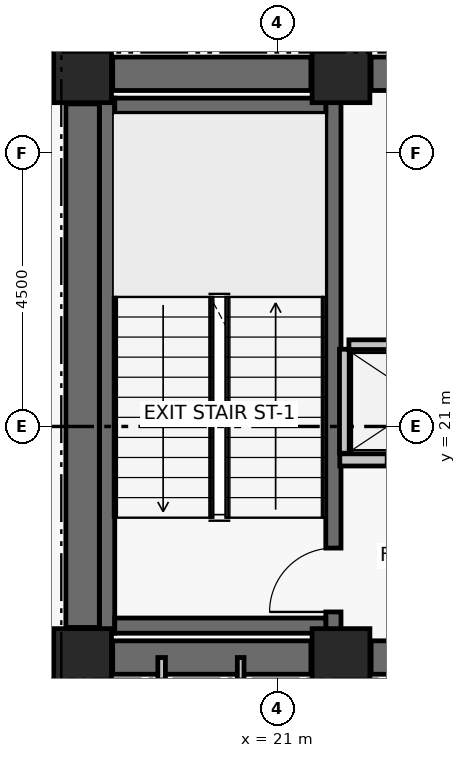
"""IFC4 building model, lengths in metres.
Left out: names, types, materials, properties, quantities, classifications, styles, units other than length and angle.
Written with IfcOpenShell. Run it as: python <this file> out.ifc"""

import sys

from ifc_helpers import new_model, si_unit, direction, frame, frame_2d, origin, origin_2d, place, context, subcontext, project, spatial, rectangle, extrude, element, fill, save


model = new_model("IFC4")
c1 = context("Model", 3, precision=1e-05, world=origin(), true_north=direction((0.0, 1.0)))
c2 = subcontext(c1, "Body", "Model", "MODEL_VIEW")
j1 = project(units=[si_unit("LENGTHUNIT", "METRE"), si_unit("PLANEANGLEUNIT", "RADIAN")], contexts=[c1])
p1 = place(None, origin())
s1 = spatial("IfcSite", under=j1, at=p1, CompositionType="ELEMENT")
p2 = place(p1, origin())
s2 = spatial("IfcBuilding", under=s1, at=p2, CompositionType="ELEMENT")
p3 = place(p2, frame((0.0, 0.0, 154.32)))
s3 = spatial("IfcBuildingStorey", under=s2, at=p3, CompositionType="ELEMENT", Elevation=154.32)
for number, where, z_axis, x_axis in (
    (1, (17.8, 17.2, 0.0), (0.0, 0.0, 1.0), (1.0, 0.0, 0.0)),
    (2, (22.05, 17.2, 0.0), (0.0, 0.0, 1.0), (1.0, 0.0, 0.0)),
    (3, (17.8, 26.8, 0.0), (0.0, 0.0, 1.0), (1.0, 0.0, 0.0)),
    (4, (22.05, 26.8, 0.0), (0.0, 0.0, 1.0), (1.0, 0.0, 0.0)),
):
    element("IfcColumn", number, at=place(p3, frame(where, z_axis=z_axis, x_axis=x_axis)), inside=s3, PredefinedType="COLUMN", context=c2, shape_type="SweptSolid", body=[
        extrude(rectangle(XDim=0.95, YDim=0.95, at=origin_2d()), origin(), (0.0, 0.0, 1.0), 3.72),
    ])
p4 = place(p3, frame((18.295, 17.2, 0.0), z_axis=(0.0, 0.0, 1.0), x_axis=(1.0, 0.0, 0.0)))
e5 = element("IfcWall", 5, at=p4, inside=s3, PredefinedType="SHEAR", context=c2, shape_type="SweptSolid", body=[
    extrude(rectangle(XDim=3.26, YDim=0.55, at=frame_2d((1.63, 0.0))), origin(), (0.0, 0.0, 1.0), 3.5),
])
p5 = place(p3, frame((22.545, 17.2, 0.0), z_axis=(0.0, 0.0, 1.0), x_axis=(1.0, 0.0, 0.0)))
e6 = element("IfcWall", 6, at=p5, inside=s3, PredefinedType="SHEAR", context=c2, shape_type="SweptSolid", body=[
    extrude(rectangle(XDim=1.805, YDim=0.55, at=frame_2d((0.903, 0.0))), origin(), (0.0, 0.0, 1.0), 3.5),
])
p6 = place(p3, frame((18.295, 26.8, 0.0), z_axis=(0.0, 0.0, 1.0), x_axis=(1.0, 0.0, 0.0)))
e7 = element("IfcWall", 7, at=p6, inside=s3, PredefinedType="SHEAR", context=c2, shape_type="SweptSolid", body=[
    extrude(rectangle(XDim=3.26, YDim=0.55, at=frame_2d((1.63, 0.0))), origin(), (0.0, 0.0, 1.0), 3.5),
])
p7 = place(p3, frame((22.545, 26.8, 0.0), z_axis=(0.0, 0.0, 1.0), x_axis=(1.0, 0.0, 0.0)))
e8 = element("IfcWall", 8, at=p7, inside=s3, PredefinedType="SHEAR", context=c2, shape_type="SweptSolid", body=[
    extrude(rectangle(XDim=1.805, YDim=0.55, at=frame_2d((0.903, 0.0))), origin(), (0.0, 0.0, 1.0), 3.5),
])
p8 = place(p3, frame((17.8, 17.695, 0.0), z_axis=(0.0, 0.0, 1.0), x_axis=(0.0, 1.0, 0.0)))
e9 = element("IfcWall", 9, at=p8, inside=s3, PredefinedType="SHEAR", context=c2, shape_type="SweptSolid", body=[
    extrude(rectangle(XDim=8.61, YDim=0.55, at=frame_2d((4.305, 0.0))), origin(), (0.0, 0.0, 1.0), 3.5),
])
p9 = place(p3, frame((18.204, 17.6, 0.0), z_axis=(0.0, 0.0, 1.0), x_axis=(0.0, 1.0, 0.0)))
e10 = element("IfcWall", 10, at=p9, inside=s3, PredefinedType="SHEAR", context=c2, shape_type="SweptSolid", body=[
    extrude(rectangle(XDim=8.8, YDim=0.25, at=frame_2d((4.4, 0.0))), origin(), (0.0, 0.0, 1.0), 3.5),
])
p10 = place(p3, frame((21.925, 17.6, 0.0), z_axis=(0.0, 0.0, 1.0), x_axis=(0.0, 1.0, 0.0)))
e11 = element("IfcWall", 11, at=p10, inside=s3, PredefinedType="SHEAR", context=c2, shape_type="SweptSolid", body=[
    extrude(rectangle(XDim=8.8, YDim=0.25, at=frame_2d((4.4, 0.0))), origin(), (0.0, 0.0, 1.0), 3.5),
])
p11 = place(p10, frame((0.35, 0.0, 0.0)))
e12 = element("IfcOpeningElement", 12, at=p11, cuts=e11, PredefinedType="OPENING", context=c2, shape_type="SweptSolid", body=[
    extrude(rectangle(XDim=1.05, YDim=2.08, at=frame_2d((0.525, 1.04))), frame((0.0, 0.135, 0.0), z_axis=(0.0, -1.0, 0.0), x_axis=(1.0, 0.0, 0.0)), (0.0, 0.0, 1.0), 0.27),
])
for number, where, z_axis, x_axis in (
    (13, (18.329, 17.725, 0.0), (0.0, 0.0, 1.0), (1.0, 0.0, 0.0)),
    (14, (18.329, 26.275, 0.0), (0.0, 0.0, 1.0), (1.0, 0.0, 0.0)),
):
    element("IfcWall", number, at=place(p3, frame(where, z_axis=z_axis, x_axis=x_axis)), inside=s3, PredefinedType="SHEAR", context=c2, shape_type="SweptSolid", body=[
        extrude(rectangle(XDim=3.471, YDim=0.25, at=frame_2d((1.735, 0.0))), origin(), (0.0, 0.0, 1.0), 3.5),
    ])
p12 = place(p3, frame((22.03, 20.45, 0.0), z_axis=(0.0, 0.0, 1.0), x_axis=(1.0, 0.0, 0.0)))
e15 = element("IfcWall", 15, at=p12, inside=s3, PredefinedType="PARTITIONING", context=c2, shape_type="SweptSolid", body=[
    extrude(rectangle(XDim=2.8, YDim=0.2, at=frame_2d((1.4, 0.0))), origin(), (0.0, 0.0, 1.0), 3.5),
])
p13 = place(p12, frame((0.78, 0.0, 0.0)))
e16 = element("IfcOpeningElement", 16, at=p13, cuts=e15, PredefinedType="OPENING", context=c2, shape_type="SweptSolid", body=[
    extrude(rectangle(XDim=1.1, YDim=2.08, at=frame_2d((0.55, 1.04))), frame((0.0, 0.11, 0.0), z_axis=(0.0, -1.0, 0.0), x_axis=(1.0, 0.0, 0.0)), (0.0, 0.0, 1.0), 0.22),
])
p14 = place(p3, frame((22.105, 20.56, 0.0), z_axis=(0.0, 0.0, 1.0), x_axis=(0.0, 1.0, 0.0)))
e17 = element("IfcWall", 17, at=p14, inside=s3, PredefinedType="PARTITIONING", context=c2, shape_type="SweptSolid", body=[
    extrude(rectangle(XDim=1.71, YDim=0.16, at=frame_2d((0.855, 0.0))), origin(), (0.0, 0.0, 1.0), 3.5),
])
p15 = place(p3, frame((22.18, 22.345, 0.0), z_axis=(0.0, 0.0, 1.0), x_axis=(1.0, 0.0, 0.0)))
e18 = element("IfcWall", 18, at=p15, inside=s3, PredefinedType="PARTITIONING", context=c2, shape_type="SweptSolid", body=[
    extrude(rectangle(XDim=2.65, YDim=0.16, at=frame_2d((1.325, 0.0))), origin(), (0.0, 0.0, 1.0), 3.5),
])
p16 = place(p3, frame((19.1, 14.95, 0.0), z_axis=(0.0, 0.0, 1.0), x_axis=(0.0, 1.0, 0.0)))
e19 = element("IfcWall", 19, at=p16, inside=s3, PredefinedType="PARTITIONING", context=c2, shape_type="SweptSolid", body=[
    extrude(rectangle(XDim=2.25, YDim=0.125, at=frame_2d((1.125, 0.0))), origin(), (0.0, 0.0, 1.0), 2.63),
])
p17 = place(p3, frame((20.4, 14.95, 0.0), z_axis=(0.0, 0.0, 1.0), x_axis=(0.0, 1.0, 0.0)))
e20 = element("IfcWall", 20, at=p17, inside=s3, PredefinedType="PARTITIONING", context=c2, shape_type="SweptSolid", body=[
    extrude(rectangle(XDim=2.25, YDim=0.11, at=frame_2d((1.125, 0.0))), origin(), (0.0, 0.0, 1.0), 2.63),
])
p18 = place(p3, frame((22.36, 14.95, 0.0), z_axis=(0.0, 0.0, 1.0), x_axis=(0.0, 1.0, 0.0)))
e21 = element("IfcWall", 21, at=p18, inside=s3, PredefinedType="PARTITIONING", context=c2, shape_type="SweptSolid", body=[
    extrude(rectangle(XDim=2.25, YDim=0.125, at=frame_2d((1.125, 0.0))), origin(), (0.0, 0.0, 1.0), 2.63),
])
p19 = place(p3, frame((15.2, 27.06, 0.0), z_axis=(0.0, 0.0, 1.0), x_axis=(1.0, 0.0, 0.0)))
e22 = element("IfcWall", 22, at=p19, inside=s3, PredefinedType="PARTITIONING", context=c2, shape_type="SweptSolid", body=[
    extrude(rectangle(XDim=2.18, YDim=0.145, at=frame_2d((1.09, 0.0))), origin(), (0.0, 0.0, 1.0), 2.73),
])
p20 = place(p11, origin())
e23 = element("IfcDoor", 23, at=p20, inside=s3, OperationType="SINGLE_SWING_LEFT", PredefinedType="DOOR", context=c2, shape_type="SweptSolid", body=[
    extrude(rectangle(XDim=1.05, YDim=2.08, at=frame_2d((0.525, 1.04))), frame((0.0, 0.025, 0.0), z_axis=(0.0, -1.0, 0.0), x_axis=(1.0, 0.0, 0.0)), (0.0, 0.0, 1.0), 0.05),
])
fill(e12, e23)
save(model, sys.argv[1])
